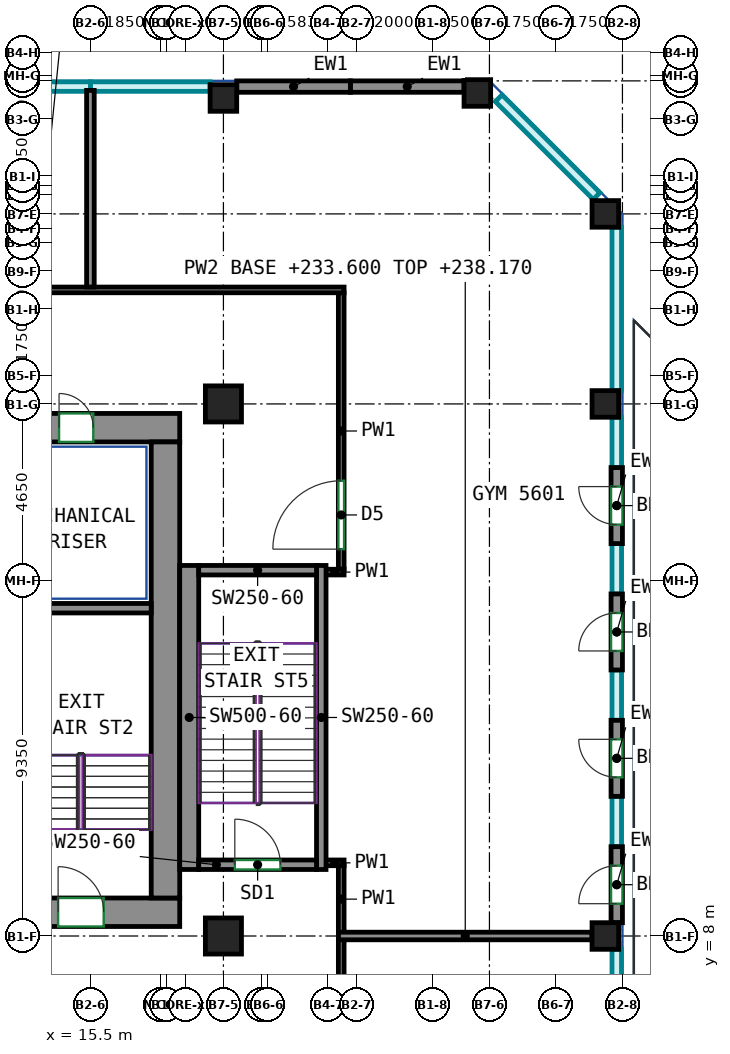
"""IFC4 building model, lengths in metres.
Left out: names, types, materials, properties, quantities, classifications, styles, units other than length and angle.
Written with IfcOpenShell. Run it as: python <this file> out.ifc"""

import sys

from ifc_helpers import new_model, si_unit, direction, frame, frame_2d, origin, origin_2d, place, context, subcontext, project, spatial, rectangle, extrude, source, transform, mapped, element, fill, save


model = new_model("IFC4")
c1 = context("Model", 3, precision=1e-05, world=origin(), true_north=direction((0.0, 1.0)))
c2 = subcontext(c1, "Body", "Model", "MODEL_VIEW")
j1 = project(units=[si_unit("LENGTHUNIT", "METRE"), si_unit("PLANEANGLEUNIT", "RADIAN")], contexts=[c1])
p1 = place(None, origin())
s1 = spatial("IfcSite", under=j1, at=p1, CompositionType="ELEMENT")
p2 = place(p1, origin())
s2 = spatial("IfcBuilding", under=s1, at=p2, CompositionType="ELEMENT")
p3 = place(p2, frame((0.0, 0.0, 233.6)))
s3 = spatial("IfcBuildingStorey", under=s2, at=p3, CompositionType="ELEMENT", Elevation=233.6)
m1 = source(origin(), c2, "Body", "SweptSolid", [
    extrude(rectangle(XDim=0.95, YDim=0.95, at=origin_2d()), origin(), (0.0, 0.0, 1.0), 5.12),
])
for number, where, z_axis, x_axis in (
    (1, (19.0, 8.0, 0.0), (0.0, 0.0, 1.0), (1.0, 0.0, 0.0)),
    (2, (19.0, 22.0, 0.0), (0.0, 0.0, 1.0), (1.0, 0.0, 0.0)),
):
    element("IfcColumn", number, at=place(p3, frame(where, z_axis=z_axis, x_axis=x_axis)), inside=s3, PredefinedType="COLUMN", context=c2, shape_type="MappedRepresentation", body=[
        mapped(m1, transform((0.0, 0.0, 0.0))),
    ])
m2 = source(origin(), c2, "Body", "SweptSolid", [
    extrude(rectangle(XDim=0.7, YDim=0.7, at=origin_2d()), origin(), (0.0, 0.0, 1.0), 5.12),
])
for number, where, z_axis, x_axis in (
    (3, (19.0, 30.05, 0.0), (0.0, 0.0, 1.0), (1.0, 0.0, 0.0)),
    (4, (25.682, 30.182, 0.0), (0.0, 0.0, 1.0), (1.0, 0.0, 0.0)),
    (5, (29.05, 8.0, 0.0), (0.0, 0.0, 1.0), (1.0, 0.0, 0.0)),
    (6, (29.05, 22.0, 0.0), (0.0, 0.0, 1.0), (1.0, 0.0, 0.0)),
    (7, (29.05, 27.0, 0.0), (0.0, 0.0, 1.0), (1.0, 0.0, 0.0)),
):
    element("IfcColumn", number, at=place(p3, frame(where, z_axis=z_axis, x_axis=x_axis)), inside=s3, PredefinedType="COLUMN", context=c2, shape_type="MappedRepresentation", body=[
        mapped(m2, transform((0.0, 0.0, 0.0))),
    ])
m3 = source(origin(), c2, "Body", "SweptSolid", [
    extrude(rectangle(XDim=5.38, YDim=0.75, at=frame_2d((2.69, 0.0))), origin(), (0.0, 0.0, 1.0), 5.12),
])
p4 = place(p3, frame((12.47, 8.625, 0.0), z_axis=(0.0, 0.0, 1.0), x_axis=(1.0, 0.0, 0.0)))
e8 = element("IfcWall", 8, at=p4, inside=s3, PredefinedType="SHEAR", context=c2, shape_type="MappedRepresentation", body=[
    mapped(m3, transform((0.0, 0.0, 0.0))),
])
p5 = place(p4, frame((2.18, 0.0, 0.0)))
e9 = element("IfcOpeningElement", 9, at=p5, cuts=e8, PredefinedType="OPENING", context=c2, shape_type="SweptSolid", body=[
    extrude(rectangle(XDim=1.2, YDim=2.1, at=frame_2d((0.6, 1.05))), frame((0.0, 0.385, 0.0), z_axis=(0.0, -1.0, 0.0), x_axis=(1.0, 0.0, 0.0)), (0.0, 0.0, 1.0), 0.77),
])
m4 = source(origin(), c2, "Body", "SweptSolid", [
    extrude(rectangle(XDim=33.6, YDim=0.75, at=frame_2d((16.8, 0.0))), origin(), (0.0, 0.0, 1.0), 5.12),
])
p6 = place(p3, frame((-15.75, 21.375, 0.0), z_axis=(0.0, 0.0, 1.0), x_axis=(1.0, 0.0, 0.0)))
e10 = element("IfcWall", 10, at=p6, inside=s3, PredefinedType="SHEAR", context=c2, shape_type="MappedRepresentation", body=[
    mapped(m4, transform((0.0, 0.0, 0.0))),
])
p7 = place(p6, frame((5.858, 0.0, 0.0)))
e11 = element("IfcOpeningElement", 11, at=p7, cuts=e10, PredefinedType="OPENING", context=c2, shape_type="SweptSolid", body=[
    extrude(rectangle(XDim=0.9, YDim=2.1, at=frame_2d((0.45, 1.05))), frame((0.0, 0.385, 0.0), z_axis=(0.0, -1.0, 0.0), x_axis=(1.0, 0.0, 0.0)), (0.0, 0.0, 1.0), 0.77),
])
p8 = place(p6, frame((10.923, 0.0, 0.0)))
e12 = element("IfcOpeningElement", 12, at=p8, cuts=e10, PredefinedType="OPENING", context=c2, shape_type="SweptSolid", body=[
    extrude(rectangle(XDim=0.9, YDim=2.1, at=frame_2d((0.45, 1.05))), frame((0.0, 0.385, 0.0), z_axis=(0.0, -1.0, 0.0), x_axis=(1.0, 0.0, 0.0)), (0.0, 0.0, 1.0), 0.77),
])
p9 = place(p6, frame((16.055, 0.0, 0.0)))
e13 = element("IfcOpeningElement", 13, at=p9, cuts=e10, PredefinedType="OPENING", context=c2, shape_type="SweptSolid", body=[
    extrude(rectangle(XDim=0.9, YDim=2.1, at=frame_2d((0.45, 1.05))), frame((0.0, 0.385, 0.0), z_axis=(0.0, -1.0, 0.0), x_axis=(1.0, 0.0, 0.0)), (0.0, 0.0, 1.0), 0.77),
])
p10 = place(p6, frame((20.879, 0.0, 0.0)))
e14 = element("IfcOpeningElement", 14, at=p10, cuts=e10, PredefinedType="OPENING", context=c2, shape_type="SweptSolid", body=[
    extrude(rectangle(XDim=0.9, YDim=2.1, at=frame_2d((0.45, 1.05))), frame((0.0, 0.385, 0.0), z_axis=(0.0, -1.0, 0.0), x_axis=(1.0, 0.0, 0.0)), (0.0, 0.0, 1.0), 0.77),
])
p11 = place(p6, frame((26.239, 0.0, 0.0)))
e15 = element("IfcOpeningElement", 15, at=p11, cuts=e10, PredefinedType="OPENING", context=c2, shape_type="SweptSolid", body=[
    extrude(rectangle(XDim=0.9, YDim=2.1, at=frame_2d((0.45, 1.05))), frame((0.0, 0.385, 0.0), z_axis=(0.0, -1.0, 0.0), x_axis=(1.0, 0.0, 0.0)), (0.0, 0.0, 1.0), 0.77),
])
p12 = place(p6, frame((2.275, 0.0, 0.0)))
e16 = element("IfcOpeningElement", 16, at=p12, cuts=e10, PredefinedType="OPENING", context=c2, shape_type="SweptSolid", body=[
    extrude(rectangle(XDim=0.9, YDim=2.1, at=frame_2d((0.45, 1.05))), frame((0.0, 0.385, 0.0), z_axis=(0.0, -1.0, 0.0), x_axis=(1.0, 0.0, 0.0)), (0.0, 0.0, 1.0), 0.77),
])
p13 = place(p6, frame((30.425, 0.0, 0.0)))
e17 = element("IfcOpeningElement", 17, at=p13, cuts=e10, PredefinedType="OPENING", context=c2, shape_type="SweptSolid", body=[
    extrude(rectangle(XDim=0.9, YDim=2.1, at=frame_2d((0.45, 1.05))), frame((0.0, 0.385, 0.0), z_axis=(0.0, -1.0, 0.0), x_axis=(1.0, 0.0, 0.0)), (0.0, 0.0, 1.0), 0.77),
])
m5 = source(origin(), c2, "Body", "SweptSolid", [
    extrude(rectangle(XDim=12.0, YDim=0.75, at=frame_2d((6.0, 0.0))), origin(), (0.0, 0.0, 1.0), 5.12),
])
p14 = place(p3, frame((17.475, 9.0, 0.0), z_axis=(0.0, 0.0, 1.0), x_axis=(0.0, 1.0, 0.0)))
e18 = element("IfcWall", 18, at=p14, inside=s3, PredefinedType="SHEAR", context=c2, shape_type="MappedRepresentation", body=[
    mapped(m5, transform((0.0, 0.0, 0.0))),
])
m6 = source(origin(), c2, "Body", "SweptSolid", [
    extrude(rectangle(XDim=3.7, YDim=0.25, at=frame_2d((1.85, 0.0))), origin(), (0.0, 0.0, 1.0), 5.12),
])
p15 = place(p3, frame((13.4, 16.625, 0.0), z_axis=(0.0, 0.0, 1.0), x_axis=(1.0, 0.0, 0.0)))
e19 = element("IfcWall", 19, at=p15, inside=s3, PredefinedType="SHEAR", context=c2, shape_type="MappedRepresentation", body=[
    mapped(m6, transform((0.0, 0.0, 0.0))),
])
m7 = source(origin(), c2, "Body", "SweptSolid", [
    extrude(rectangle(XDim=8.0, YDim=0.5, at=frame_2d((4.0, 0.0))), origin(), (0.0, 0.0, 1.0), 5.12),
])
p16 = place(p3, frame((18.1, 9.75, 0.0), z_axis=(0.0, 0.0, 1.0), x_axis=(0.0, 1.0, 0.0)))
e20 = element("IfcWall", 20, at=p16, inside=s3, PredefinedType="SHEAR", context=c2, shape_type="MappedRepresentation", body=[
    mapped(m7, transform((0.0, 0.0, 0.0))),
])
m8 = source(origin(), c2, "Body", "SweptSolid", [
    extrude(rectangle(XDim=8.0, YDim=0.25, at=frame_2d((4.0, 0.0))), origin(), (0.0, 0.0, 1.0), 5.12),
])
p17 = place(p3, frame((21.575, 9.75, 0.0), z_axis=(0.0, 0.0, 1.0), x_axis=(0.0, 1.0, 0.0)))
e21 = element("IfcWall", 21, at=p17, inside=s3, PredefinedType="SHEAR", context=c2, shape_type="MappedRepresentation", body=[
    mapped(m8, transform((0.0, 0.0, 0.0))),
])
m9 = source(origin(), c2, "Body", "SweptSolid", [
    extrude(rectangle(XDim=3.1, YDim=0.25, at=frame_2d((1.55, 0.0))), origin(), (0.0, 0.0, 1.0), 5.12),
])
p18 = place(p3, frame((18.35, 9.875, 0.0), z_axis=(0.0, 0.0, 1.0), x_axis=(1.0, 0.0, 0.0)))
e22 = element("IfcWall", 22, at=p18, inside=s3, PredefinedType="SHEAR", context=c2, shape_type="MappedRepresentation", body=[
    mapped(m9, transform((0.0, 0.0, 0.0))),
])
p19 = place(p18, frame((0.95, 0.0, 0.0)))
e23 = element("IfcOpeningElement", 23, at=p19, cuts=e22, PredefinedType="OPENING", context=c2, shape_type="SweptSolid", body=[
    extrude(rectangle(XDim=1.2, YDim=2.1, at=frame_2d((0.6, 1.05))), frame((0.0, 0.135, 0.0), z_axis=(0.0, -1.0, 0.0), x_axis=(1.0, 0.0, 0.0)), (0.0, 0.0, 1.0), 0.27),
])
p20 = place(p3, frame((18.35, 17.625, 0.0), z_axis=(0.0, 0.0, 1.0), x_axis=(1.0, 0.0, 0.0)))
e24 = element("IfcWall", 24, at=p20, inside=s3, PredefinedType="SHEAR", context=c2, shape_type="MappedRepresentation", body=[
    mapped(m9, transform((0.0, 0.0, 0.0))),
])
m10 = source(origin(), c2, "Body", "SweptSolid", [
    extrude(rectangle(XDim=2.0, YDim=0.3, at=frame_2d((1.0, 0.0))), origin(), (0.0, 0.0, 1.0), 5.12),
])
p21 = place(p3, frame((29.35, 8.35, 0.0), z_axis=(0.0, 0.0, 1.0), x_axis=(0.0, 1.0, 0.0)))
e25 = element("IfcWall", 25, at=p21, inside=s3, PredefinedType="SOLIDWALL", context=c2, shape_type="MappedRepresentation", body=[
    mapped(m10, transform((0.0, 0.0, 0.0))),
])
p22 = place(p21, frame((0.5, 0.0, 0.0)))
e26 = element("IfcOpeningElement", 26, at=p22, cuts=e25, PredefinedType="OPENING", context=c2, shape_type="SweptSolid", body=[
    extrude(rectangle(XDim=1.0, YDim=2.1, at=frame_2d((0.5, 1.05))), frame((0.0, 0.16, 0.0), z_axis=(0.0, -1.0, 0.0), x_axis=(1.0, 0.0, 0.0)), (0.0, 0.0, 1.0), 0.32),
])
p23 = place(p3, frame((29.35, 11.675, 0.0), z_axis=(0.0, 0.0, 1.0), x_axis=(0.0, 1.0, 0.0)))
e27 = element("IfcWall", 27, at=p23, inside=s3, PredefinedType="SOLIDWALL", context=c2, shape_type="MappedRepresentation", body=[
    mapped(m10, transform((0.0, 0.0, 0.0))),
])
p24 = place(p23, frame((0.5, 0.0, 0.0)))
e28 = element("IfcOpeningElement", 28, at=p24, cuts=e27, PredefinedType="OPENING", context=c2, shape_type="SweptSolid", body=[
    extrude(rectangle(XDim=1.0, YDim=2.1, at=frame_2d((0.5, 1.05))), frame((0.0, 0.16, 0.0), z_axis=(0.0, -1.0, 0.0), x_axis=(1.0, 0.0, 0.0)), (0.0, 0.0, 1.0), 0.32),
])
p25 = place(p3, frame((29.35, 15.0, 0.0), z_axis=(0.0, 0.0, 1.0), x_axis=(0.0, 1.0, 0.0)))
e29 = element("IfcWall", 29, at=p25, inside=s3, PredefinedType="SOLIDWALL", context=c2, shape_type="MappedRepresentation", body=[
    mapped(m10, transform((0.0, 0.0, 0.0))),
])
p26 = place(p25, frame((0.5, 0.0, 0.0)))
e30 = element("IfcOpeningElement", 30, at=p26, cuts=e29, PredefinedType="OPENING", context=c2, shape_type="SweptSolid", body=[
    extrude(rectangle(XDim=1.0, YDim=2.1, at=frame_2d((0.5, 1.05))), frame((0.0, 0.16, 0.0), z_axis=(0.0, -1.0, 0.0), x_axis=(1.0, 0.0, 0.0)), (0.0, 0.0, 1.0), 0.32),
])
p27 = place(p3, frame((29.35, 18.325, 0.0), z_axis=(0.0, 0.0, 1.0), x_axis=(0.0, 1.0, 0.0)))
e31 = element("IfcWall", 31, at=p27, inside=s3, PredefinedType="SOLIDWALL", context=c2, shape_type="MappedRepresentation", body=[
    mapped(m10, transform((0.0, 0.0, 0.0))),
])
p28 = place(p27, frame((0.5, 0.0, 0.0)))
e32 = element("IfcOpeningElement", 32, at=p28, cuts=e31, PredefinedType="OPENING", context=c2, shape_type="SweptSolid", body=[
    extrude(rectangle(XDim=1.0, YDim=2.1, at=frame_2d((0.5, 1.05))), frame((0.0, 0.16, 0.0), z_axis=(0.0, -1.0, 0.0), x_axis=(1.0, 0.0, 0.0)), (0.0, 0.0, 1.0), 0.32),
])
m11 = source(origin(), c2, "Body", "SweptSolid", [
    extrude(rectangle(XDim=2.991, YDim=0.3, at=frame_2d((1.496, 0.0))), origin(), (0.0, 0.0, 1.0), 5.12),
])
p29 = place(p3, frame((25.332, 30.35, 0.0), z_axis=(0.0, 0.0, 1.0), x_axis=(-1.0, 0.0, 0.0)))
e33 = element("IfcWall", 33, at=p29, inside=s3, PredefinedType="SOLIDWALL", context=c2, shape_type="MappedRepresentation", body=[
    mapped(m11, transform((0.0, 0.0, 0.0))),
])
m12 = source(origin(), c2, "Body", "SweptSolid", [
    extrude(rectangle(XDim=2.991, YDim=0.3, at=frame_2d((1.495, 0.0))), origin(), (0.0, 0.0, 1.0), 5.12),
])
p30 = place(p3, frame((22.341, 30.35, 0.0), z_axis=(0.0, 0.0, 1.0), x_axis=(-1.0, 0.0, 0.0)))
e34 = element("IfcWall", 34, at=p30, inside=s3, PredefinedType="SOLIDWALL", context=c2, shape_type="MappedRepresentation", body=[
    mapped(m12, transform((0.0, 0.0, 0.0))),
])
p31 = place(p3, frame((22.1, 3.075, 0.0), z_axis=(0.0, 0.0, 1.0), x_axis=(0.0, 1.0, 0.0)))
e35 = element("IfcWall", 35, at=p31, inside=s3, PredefinedType="PARTITIONING", context=c2, shape_type="SweptSolid", body=[
    extrude(rectangle(XDim=4.835, YDim=0.15, at=frame_2d((2.417, 0.0))), origin(), (0.0, 0.0, 1.0), 5.12),
])
p32 = place(p31, frame((2.321, 0.0, 0.0)))
e36 = element("IfcOpeningElement", 36, at=p32, cuts=e35, PredefinedType="OPENING", context=c2, shape_type="SweptSolid", body=[
    extrude(rectangle(XDim=0.9, YDim=2.1, at=frame_2d((0.45, 1.05))), frame((0.0, 0.085, 0.0), z_axis=(0.0, -1.0, 0.0), x_axis=(1.0, 0.0, 0.0)), (0.0, 0.0, 1.0), 0.17),
])
p33 = place(p3, frame((22.1, 17.65, 0.0), z_axis=(0.0, 0.0, 1.0), x_axis=(0.0, 1.0, 0.0)))
e37 = element("IfcWall", 37, at=p33, inside=s3, PredefinedType="PARTITIONING", context=c2, shape_type="SweptSolid", body=[
    extrude(rectangle(XDim=7.275, YDim=0.15, at=frame_2d((3.638, 0.0))), origin(), (0.0, 0.0, 1.0), 5.12),
])
p34 = place(p33, frame((0.529, 0.0, 0.0)))
e38 = element("IfcOpeningElement", 38, at=p34, cuts=e37, PredefinedType="OPENING", context=c2, shape_type="SweptSolid", body=[
    extrude(rectangle(XDim=1.8, YDim=2.1, at=frame_2d((0.9, 1.05))), frame((0.0, 0.085, 0.0), z_axis=(0.0, -1.0, 0.0), x_axis=(1.0, 0.0, 0.0)), (0.0, 0.0, 1.0), 0.17),
])
for number, where, z_axis, x_axis in (
    (39, (21.68, 17.575, 0.0), (0.0, 0.0, 1.0), (1.0, 0.0, 0.0)),
    (40, (22.175, 9.925, 0.0), (0.0, 0.0, 1.0), (-1.0, 0.0, 0.0)),
):
    element("IfcWall", number, at=place(p3, frame(where, z_axis=z_axis, x_axis=x_axis)), inside=s3, PredefinedType="PARTITIONING", context=c2, shape_type="SweptSolid", body=[
        extrude(rectangle(XDim=0.495, YDim=0.15, at=frame_2d((0.248, 0.0))), origin(), (0.0, 0.0, 1.0), 5.12),
    ])
p35 = place(p3, frame((22.1, 8.09, 0.0), z_axis=(0.0, 0.0, 1.0), x_axis=(0.0, 1.0, 0.0)))
e41 = element("IfcWall", 41, at=p35, inside=s3, PredefinedType="PARTITIONING", context=c2, shape_type="SweptSolid", body=[
    extrude(rectangle(XDim=1.76, YDim=0.15, at=frame_2d((0.88, 0.0))), origin(), (0.0, 0.0, 1.0), 5.12),
])
p36 = place(p3, frame((-18.999, 25.0, 0.0), z_axis=(0.0, 0.0, 1.0), x_axis=(1.0, 0.0, 0.0)))
e42 = element("IfcWall", 42, at=p36, inside=s3, PredefinedType="PARTITIONING", context=c2, shape_type="SweptSolid", body=[
    extrude(rectangle(XDim=41.174, YDim=0.15, at=frame_2d((20.587, 0.0))), origin(), (0.0, 0.0, 1.0), 5.12),
])
p37 = place(p36, frame((2.901, 0.0, 0.0)))
e43 = element("IfcOpeningElement", 43, at=p37, cuts=e42, PredefinedType="OPENING", context=c2, shape_type="SweptSolid", body=[
    extrude(rectangle(XDim=0.9, YDim=2.1, at=frame_2d((0.45, 1.05))), frame((0.0, 0.085, 0.0), z_axis=(0.0, -1.0, 0.0), x_axis=(1.0, 0.0, 0.0)), (0.0, 0.0, 1.0), 0.17),
])
p38 = place(p36, frame((31.904, 0.0, 0.0)))
e44 = element("IfcOpeningElement", 44, at=p38, cuts=e42, PredefinedType="OPENING", context=c2, shape_type="SweptSolid", body=[
    extrude(rectangle(XDim=1.0, YDim=2.1, at=frame_2d((0.5, 1.05))), frame((0.0, 0.085, 0.0), z_axis=(0.0, -1.0, 0.0), x_axis=(1.0, 0.0, 0.0)), (0.0, 0.0, 1.0), 0.17),
])
p39 = place(p3, frame((28.7, 8.0, 0.0), z_axis=(0.0, 0.0, 1.0), x_axis=(-1.0, 0.0, 0.0)))
e45 = element("IfcWall", 45, at=p39, inside=s3, PredefinedType="PARTITIONING", context=c2, shape_type="SweptSolid", body=[
    extrude(rectangle(XDim=6.673, YDim=0.2, at=frame_2d((3.336, 0.0))), origin(), (0.0, 0.0, 1.0), 4.57),
])
p40 = place(p3, frame((15.5, 30.25, 0.0), z_axis=(0.0, 0.0, 1.0), x_axis=(0.0, -1.0, 0.0)))
e46 = element("IfcWall", 46, at=p40, inside=s3, PredefinedType="PARTITIONING", context=c2, shape_type="SweptSolid", body=[
    extrude(rectangle(XDim=5.173, YDim=0.2, at=frame_2d((2.586, 0.0))), origin(), (0.0, 0.0, 1.0), 5.12),
])
p41 = place(p22, origin())
e47 = element("IfcDoor", 47, at=p41, inside=s3, OperationType="SINGLE_SWING_LEFT", PredefinedType="DOOR", context=c2, shape_type="SweptSolid", body=[
    extrude(rectangle(XDim=1.0, YDim=2.1, at=frame_2d((0.5, 1.05))), frame((0.0, 0.025, 0.0), z_axis=(0.0, -1.0, 0.0), x_axis=(1.0, 0.0, 0.0)), (0.0, 0.0, 1.0), 0.05),
])
fill(e26, e47)
p42 = place(p24, origin())
e48 = element("IfcDoor", 48, at=p42, inside=s3, OperationType="SINGLE_SWING_RIGHT", PredefinedType="DOOR", context=c2, shape_type="SweptSolid", body=[
    extrude(rectangle(XDim=1.0, YDim=2.1, at=frame_2d((0.5, 1.05))), frame((0.0, 0.025, 0.0), z_axis=(0.0, -1.0, 0.0), x_axis=(1.0, 0.0, 0.0)), (0.0, 0.0, 1.0), 0.05),
])
fill(e28, e48)
p43 = place(p26, origin())
e49 = element("IfcDoor", 49, at=p43, inside=s3, OperationType="SINGLE_SWING_LEFT", PredefinedType="DOOR", context=c2, shape_type="SweptSolid", body=[
    extrude(rectangle(XDim=1.0, YDim=2.1, at=frame_2d((0.5, 1.05))), frame((0.0, 0.025, 0.0), z_axis=(0.0, -1.0, 0.0), x_axis=(1.0, 0.0, 0.0)), (0.0, 0.0, 1.0), 0.05),
])
fill(e30, e49)
p44 = place(p28, origin())
e50 = element("IfcDoor", 50, at=p44, inside=s3, OperationType="SINGLE_SWING_RIGHT", PredefinedType="DOOR", context=c2, shape_type="SweptSolid", body=[
    extrude(rectangle(XDim=1.0, YDim=2.1, at=frame_2d((0.5, 1.05))), frame((0.0, 0.025, 0.0), z_axis=(0.0, -1.0, 0.0), x_axis=(1.0, 0.0, 0.0)), (0.0, 0.0, 1.0), 0.05),
])
fill(e32, e50)
p45 = place(p13, origin())
e51 = element("IfcDoor", 51, at=p45, inside=s3, OperationType="SINGLE_SWING_LEFT", PredefinedType="DOOR", context=c2, shape_type="SweptSolid", body=[
    extrude(rectangle(XDim=0.9, YDim=2.1, at=frame_2d((0.45, 1.05))), frame((0.0, -0.23, 0.0), z_axis=(0.0, -1.0, 0.0), x_axis=(1.0, 0.0, 0.0)), (0.0, 0.0, 1.0), 0.05),
])
fill(e17, e51)
p46 = place(p5, origin())
e52 = element("IfcDoor", 52, at=p46, inside=s3, OperationType="DOUBLE_DOOR_SINGLE_SWING", PredefinedType="DOOR", context=c2, shape_type="SweptSolid", body=[
    extrude(rectangle(XDim=1.2, YDim=2.1, at=frame_2d((0.6, 1.05))), frame((0.0, 0.28, 0.0), z_axis=(0.0, -1.0, 0.0), x_axis=(1.0, 0.0, 0.0)), (0.0, 0.0, 1.0), 0.05),
])
fill(e9, e52)
p47 = place(p19, origin())
e53 = element("IfcDoor", 53, at=p47, inside=s3, OperationType="DOUBLE_DOOR_SINGLE_SWING", PredefinedType="DOOR", context=c2, shape_type="SweptSolid", body=[
    extrude(rectangle(XDim=1.2, YDim=2.1, at=frame_2d((0.6, 1.05))), frame((0.0, 0.025, 0.0), z_axis=(0.0, -1.0, 0.0), x_axis=(1.0, 0.0, 0.0)), (0.0, 0.0, 1.0), 0.05),
])
fill(e23, e53)
p48 = place(p34, origin())
e54 = element("IfcDoor", 54, at=p48, inside=s3, OperationType="DOUBLE_DOOR_SINGLE_SWING", PredefinedType="DOOR", context=c2, shape_type="SweptSolid", body=[
    extrude(rectangle(XDim=1.8, YDim=2.1, at=frame_2d((0.9, 1.05))), frame((0.0, 0.025, 0.0), z_axis=(0.0, -1.0, 0.0), x_axis=(1.0, 0.0, 0.0)), (0.0, 0.0, 1.0), 0.05),
])
fill(e38, e54)
save(model, sys.argv[1])
